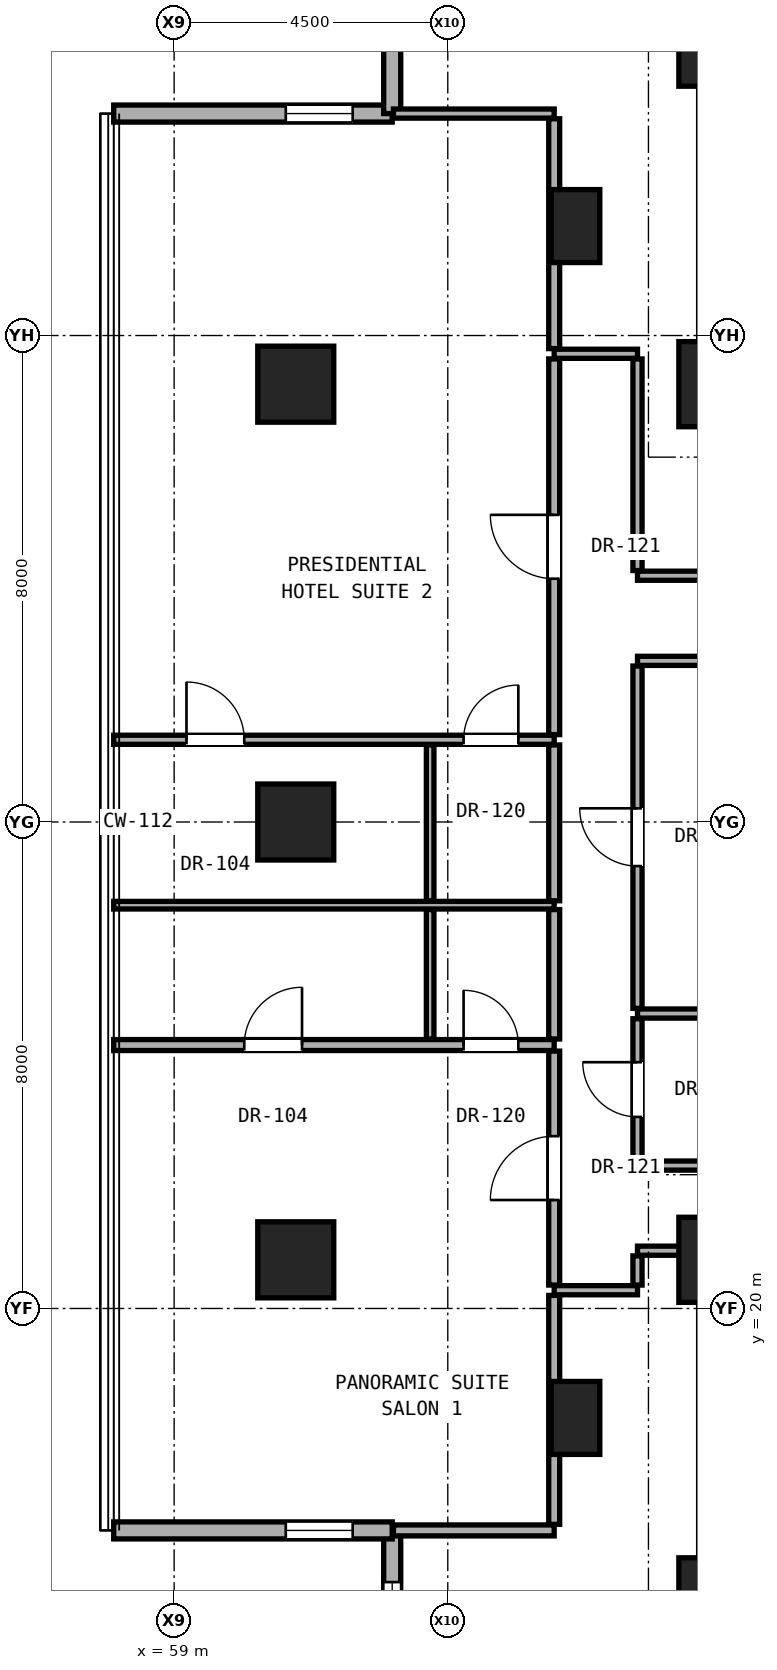
"""IFC4 building model, lengths in metres.
Left out: names, types, materials, properties, quantities, classifications, styles, units other than length and angle.
Written with IfcOpenShell. Run it as: python <this file> out.ifc"""

import sys

from ifc_helpers import new_model, si_unit, direction, frame, frame_2d, origin, origin_2d, place, context, subcontext, project, spatial, rectangle, hollow_rectangle, extrude, element, fill, save


model = new_model("IFC4")
c1 = context("Model", 3, precision=1e-05, world=origin(), true_north=direction((0.0, 1.0)))
c2 = subcontext(c1, "Body", "Model", "MODEL_VIEW")
j1 = project(units=[si_unit("LENGTHUNIT", "METRE"), si_unit("PLANEANGLEUNIT", "RADIAN")], contexts=[c1])
p1 = place(None, origin())
s1 = spatial("IfcSite", under=j1, at=p1, CompositionType="ELEMENT")
p2 = place(p1, origin())
s2 = spatial("IfcBuilding", under=s1, at=p2, CompositionType="ELEMENT")
p3 = place(p2, frame((0.0, 0.0, 32.3)))
s3 = spatial("IfcBuildingStorey", under=s2, at=p3, CompositionType="ELEMENT", Elevation=32.3)
for number, where, z_axis, x_axis in (
    (1, (68.0, 15.2, 0.0), (0.0, 0.0, 1.0), (1.0, 0.0, 0.0)),
    (2, (68.0, 20.8, 0.0), (0.0, 0.0, 1.0), (1.0, 0.0, 0.0)),
    (3, (68.0, 35.2, 0.0), (0.0, 0.0, 1.0), (1.0, 0.0, 0.0)),
    (4, (68.0, 40.8, 0.0), (0.0, 0.0, 1.0), (1.0, 0.0, 0.0)),
):
    element("IfcColumn", number, at=place(p3, frame(where, z_axis=z_axis, x_axis=x_axis)), inside=s3, PredefinedType="COLUMN", context=c2, shape_type="SweptSolid", body=[
        extrude(rectangle(XDim=1.4, YDim=1.4, at=origin_2d()), origin(), (0.0, 0.0, 1.0), 3.3),
    ])
for number, where, z_axis, x_axis in (
    (5, (61.0, 20.8, 0.0), (0.0, 0.0, 1.0), (1.0, 0.0, 0.0)),
    (6, (61.0, 28.0, 0.0), (0.0, 0.0, 1.0), (1.0, 0.0, 0.0)),
    (7, (61.0, 35.2, 0.0), (0.0, 0.0, 1.0), (1.0, 0.0, 0.0)),
):
    element("IfcColumn", number, at=place(p3, frame(where, z_axis=z_axis, x_axis=x_axis)), inside=s3, PredefinedType="COLUMN", context=c2, shape_type="SweptSolid", body=[
        extrude(hollow_rectangle(XDim=1.25, YDim=1.25, WallThickness=0.07, at=origin_2d()), origin(), (0.0, 0.0, 1.0), 3.3),
    ])
for number, where, z_axis, x_axis in (
    (8, (65.6, 18.2, 0.0), (0.0, 0.0, 1.0), (1.0, 0.0, 0.0)),
    (9, (65.6, 37.8, 0.0), (0.0, 0.0, 1.0), (1.0, 0.0, 0.0)),
):
    element("IfcColumn", number, at=place(p3, frame(where, z_axis=z_axis, x_axis=x_axis)), inside=s3, PredefinedType="PILASTER", context=c2, shape_type="SweptSolid", body=[
        extrude(rectangle(XDim=0.8, YDim=1.2, at=origin_2d()), origin(), (0.0, 0.0, 1.0), 3.3),
    ])
p4 = place(p3, frame((62.586, 16.35, 0.0), z_axis=(0.0, 0.0, 1.0), x_axis=(0.0, -1.0, 0.0)))
e10 = element("IfcWall", 10, at=p4, inside=s3, PredefinedType="SOLIDWALL", context=c2, shape_type="SweptSolid", body=[
    extrude(rectangle(XDim=4.58, YDim=0.28, at=frame_2d((2.29, 0.0))), origin(), (0.0, 0.0, 1.0), 3.04),
])
p5 = place(p4, frame((0.85, 0.0, 0.79)))
e11 = element("IfcOpeningElement", 11, at=p5, cuts=e10, PredefinedType="OPENING", context=c2, shape_type="SweptSolid", body=[
    extrude(rectangle(XDim=1.2, YDim=2.1, at=frame_2d((0.6, 1.05))), frame((0.0, 0.15, 0.0), z_axis=(0.0, -1.0, 0.0), x_axis=(1.0, 0.0, 0.0)), (0.0, 0.0, 1.0), 0.3),
])
p6 = place(p3, frame((58.006, 16.35, 0.0), z_axis=(0.0, 0.0, 1.0), x_axis=(1.0, 0.0, 0.0)))
e12 = element("IfcWall", 12, at=p6, inside=s3, PredefinedType="SOLIDWALL", context=c2, shape_type="SweptSolid", body=[
    extrude(rectangle(XDim=4.58, YDim=0.28, at=frame_2d((2.29, 0.0))), origin(), (0.0, 0.0, 1.0), 3.04),
])
p7 = place(p6, frame((2.83, 0.0, 0.85)))
e13 = element("IfcOpeningElement", 13, at=p7, cuts=e12, PredefinedType="OPENING", context=c2, shape_type="SweptSolid", body=[
    extrude(rectangle(XDim=1.1, YDim=2.0, at=frame_2d((0.55, 1.0))), frame((0.0, 0.15, 0.0), z_axis=(0.0, -1.0, 0.0), x_axis=(1.0, 0.0, 0.0)), (0.0, 0.0, 1.0), 0.3),
])
p8 = place(p3, frame((62.586, 39.65, 0.0), z_axis=(0.0, 0.0, 1.0), x_axis=(-1.0, 0.0, 0.0)))
e14 = element("IfcWall", 14, at=p8, inside=s3, PredefinedType="SOLIDWALL", context=c2, shape_type="SweptSolid", body=[
    extrude(rectangle(XDim=4.58, YDim=0.28, at=frame_2d((2.29, 0.0))), origin(), (0.0, 0.0, 1.0), 3.04),
])
p9 = place(p8, frame((0.65, 0.0, 0.85)))
e15 = element("IfcOpeningElement", 15, at=p9, cuts=e14, PredefinedType="OPENING", context=c2, shape_type="SweptSolid", body=[
    extrude(rectangle(XDim=1.1, YDim=2.0, at=frame_2d((0.55, 1.0))), frame((0.0, 0.15, 0.0), z_axis=(0.0, -1.0, 0.0), x_axis=(1.0, 0.0, 0.0)), (0.0, 0.0, 1.0), 0.3),
])
p10 = place(p3, frame((62.586, 44.23, 0.0), z_axis=(0.0, 0.0, 1.0), x_axis=(0.0, -1.0, 0.0)))
e16 = element("IfcWall", 16, at=p10, inside=s3, PredefinedType="SOLIDWALL", context=c2, shape_type="SweptSolid", body=[
    extrude(rectangle(XDim=4.58, YDim=0.28, at=frame_2d((2.29, 0.0))), origin(), (0.0, 0.0, 1.0), 3.04),
])
p11 = place(p3, frame((62.606, 16.35, 0.0), z_axis=(0.0, 0.0, 1.0), x_axis=(1.0, 0.0, 0.0)))
e17 = element("IfcWall", 17, at=p11, inside=s3, PredefinedType="PARTITIONING", context=c2, shape_type="SweptSolid", body=[
    extrude(rectangle(XDim=2.644, YDim=0.18, at=frame_2d((1.322, 0.0))), origin(), (0.0, 0.0, 1.0), 3.06),
])
p12 = place(p3, frame((65.25, 20.3, 0.0), z_axis=(0.0, 0.0, 1.0), x_axis=(1.0, 0.0, 0.0)))
e18 = element("IfcWall", 18, at=p12, inside=s3, PredefinedType="PARTITIONING", context=c2, shape_type="SweptSolid", body=[
    extrude(rectangle(XDim=1.37, YDim=0.15, at=frame_2d((0.685, 0.0))), origin(), (0.0, 0.0, 1.0), 3.06),
])
p13 = place(p3, frame((66.62, 20.95, 0.0), z_axis=(0.0, 0.0, 1.0), x_axis=(1.0, 0.0, 0.0)))
e19 = element("IfcWall", 19, at=p13, inside=s3, PredefinedType="PARTITIONING", context=c2, shape_type="SweptSolid", body=[
    extrude(rectangle(XDim=1.01, YDim=0.15, at=frame_2d((0.505, 0.0))), origin(), (0.0, 0.0, 1.0), 2.452),
])
p14 = place(p3, frame((66.62, 22.35, 0.0), z_axis=(0.0, 0.0, 1.0), x_axis=(1.0, 0.0, 0.0)))
e20 = element("IfcWall", 20, at=p14, inside=s3, PredefinedType="PARTITIONING", context=c2, shape_type="SweptSolid", body=[
    extrude(rectangle(XDim=19.63, YDim=0.15, at=frame_2d((9.815, 0.0))), origin(), (0.0, 0.0, 1.0), 2.125),
])
p15 = place(p14, frame((12.085, 0.0, 0.0)))
e21 = element("IfcOpeningElement", 21, at=p15, cuts=e20, PredefinedType="OPENING", context=c2, shape_type="SweptSolid", body=[
    extrude(rectangle(XDim=0.85, YDim=2.01, at=frame_2d((0.425, 1.005))), frame((0.0, 0.085, 0.0), z_axis=(0.0, -1.0, 0.0), x_axis=(1.0, 0.0, 0.0)), (0.0, 0.0, 1.0), 0.17),
])
p16 = place(p3, frame((58.006, 24.332, 0.0), z_axis=(0.0, 0.0, 1.0), x_axis=(1.0, 0.0, 0.0)))
e22 = element("IfcWall", 22, at=p16, inside=s3, PredefinedType="PARTITIONING", context=c2, shape_type="SweptSolid", body=[
    extrude(rectangle(XDim=7.244, YDim=0.18, at=frame_2d((3.622, 0.0))), origin(), (0.0, 0.0, 1.0), 2.196),
])
p17 = place(p16, frame((2.147, 0.0, 0.0)))
e23 = element("IfcOpeningElement", 23, at=p17, cuts=e22, PredefinedType="OPENING", context=c2, shape_type="SweptSolid", body=[
    extrude(rectangle(XDim=0.95, YDim=2.15, at=frame_2d((0.475, 1.075))), frame((0.0, 0.1, 0.0), z_axis=(0.0, -1.0, 0.0), x_axis=(1.0, 0.0, 0.0)), (0.0, 0.0, 1.0), 0.2),
])
p18 = place(p16, frame((5.754, 0.0, 0.0)))
e24 = element("IfcOpeningElement", 24, at=p18, cuts=e22, PredefinedType="OPENING", context=c2, shape_type="SweptSolid", body=[
    extrude(rectangle(XDim=0.9, YDim=2.1, at=frame_2d((0.45, 1.05))), frame((0.0, 0.1, 0.0), z_axis=(0.0, -1.0, 0.0), x_axis=(1.0, 0.0, 0.0)), (0.0, 0.0, 1.0), 0.2),
])
p19 = place(p3, frame((66.62, 24.85, 0.0), z_axis=(0.0, 0.0, 1.0), x_axis=(1.0, 0.0, 0.0)))
e25 = element("IfcWall", 25, at=p19, inside=s3, PredefinedType="PARTITIONING", context=c2, shape_type="SweptSolid", body=[
    extrude(rectangle(XDim=3.13, YDim=0.15, at=frame_2d((1.565, 0.0))), origin(), (0.0, 0.0, 1.0), 2.125),
])
p20 = place(p3, frame((58.006, 26.632, 0.0), z_axis=(0.0, 0.0, 1.0), x_axis=(1.0, 0.0, 0.0)))
e26 = element("IfcWall", 26, at=p20, inside=s3, PredefinedType="PARTITIONING", context=c2, shape_type="SweptSolid", body=[
    extrude(rectangle(XDim=7.244, YDim=0.125, at=frame_2d((3.622, 0.0))), origin(), (0.0, 0.0, 1.0), 2.196),
])
p21 = place(p3, frame((58.006, 29.352, 0.0), z_axis=(0.0, 0.0, 1.0), x_axis=(1.0, 0.0, 0.0)))
e27 = element("IfcWall", 27, at=p21, inside=s3, PredefinedType="PARTITIONING", context=c2, shape_type="SweptSolid", body=[
    extrude(rectangle(XDim=7.244, YDim=0.15, at=frame_2d((3.622, 0.0))), origin(), (0.0, 0.0, 1.0), 2.196),
])
p22 = place(p21, frame((1.197, 0.0, 0.0)))
e28 = element("IfcOpeningElement", 28, at=p22, cuts=e27, PredefinedType="OPENING", context=c2, shape_type="SweptSolid", body=[
    extrude(rectangle(XDim=0.95, YDim=2.15, at=frame_2d((0.475, 1.075))), frame((0.0, 0.085, 0.0), z_axis=(0.0, -1.0, 0.0), x_axis=(1.0, 0.0, 0.0)), (0.0, 0.0, 1.0), 0.17),
])
p23 = place(p21, frame((5.754, 0.0, 0.0)))
e29 = element("IfcOpeningElement", 29, at=p23, cuts=e27, PredefinedType="OPENING", context=c2, shape_type="SweptSolid", body=[
    extrude(rectangle(XDim=0.9, YDim=2.1, at=frame_2d((0.45, 1.05))), frame((0.0, 0.085, 0.0), z_axis=(0.0, -1.0, 0.0), x_axis=(1.0, 0.0, 0.0)), (0.0, 0.0, 1.0), 0.17),
])
p24 = place(p3, frame((66.62, 30.65, 0.0), z_axis=(0.0, 0.0, 1.0), x_axis=(1.0, 0.0, 0.0)))
e30 = element("IfcWall", 30, at=p24, inside=s3, PredefinedType="PARTITIONING", context=c2, shape_type="SweptSolid", body=[
    extrude(rectangle(XDim=19.63, YDim=0.15, at=frame_2d((9.815, 0.0))), origin(), (0.0, 0.0, 1.0), 2.125),
])
p25 = place(p24, frame((3.855, 0.0, 0.0)))
e31 = element("IfcOpeningElement", 31, at=p25, cuts=e30, PredefinedType="OPENING", context=c2, shape_type="SweptSolid", body=[
    extrude(rectangle(XDim=0.85, YDim=2.01, at=frame_2d((0.425, 1.005))), frame((0.0, 0.085, 0.0), z_axis=(0.0, -1.0, 0.0), x_axis=(1.0, 0.0, 0.0)), (0.0, 0.0, 1.0), 0.17),
])
p26 = place(p24, frame((12.085, 0.0, 0.0)))
e32 = element("IfcOpeningElement", 32, at=p26, cuts=e30, PredefinedType="OPENING", context=c2, shape_type="SweptSolid", body=[
    extrude(rectangle(XDim=0.85, YDim=2.01, at=frame_2d((0.425, 1.005))), frame((0.0, 0.085, 0.0), z_axis=(0.0, -1.0, 0.0), x_axis=(1.0, 0.0, 0.0)), (0.0, 0.0, 1.0), 0.17),
])
p27 = place(p3, frame((66.62, 32.05, 0.0), z_axis=(0.0, 0.0, 1.0), x_axis=(1.0, 0.0, 0.0)))
e33 = element("IfcWall", 33, at=p27, inside=s3, PredefinedType="PARTITIONING", context=c2, shape_type="SweptSolid", body=[
    extrude(rectangle(XDim=2.18, YDim=0.15, at=frame_2d((1.09, 0.0))), origin(), (0.0, 0.0, 1.0), 2.125),
])
p28 = place(p3, frame((65.25, 35.7, 0.0), z_axis=(0.0, 0.0, 1.0), x_axis=(1.0, 0.0, 0.0)))
e34 = element("IfcWall", 34, at=p28, inside=s3, PredefinedType="PARTITIONING", context=c2, shape_type="SweptSolid", body=[
    extrude(rectangle(XDim=1.37, YDim=0.15, at=frame_2d((0.685, 0.0))), origin(), (0.0, 0.0, 1.0), 3.06),
])
p29 = place(p3, frame((62.606, 39.65, 0.0), z_axis=(0.0, 0.0, 1.0), x_axis=(1.0, 0.0, 0.0)))
e35 = element("IfcWall", 35, at=p29, inside=s3, PredefinedType="PARTITIONING", context=c2, shape_type="SweptSolid", body=[
    extrude(rectangle(XDim=2.644, YDim=0.15, at=frame_2d((1.322, 0.0))), origin(), (0.0, 0.0, 1.0), 3.06),
])
p30 = place(p3, frame((63.21, 24.432, 0.0), z_axis=(0.0, 0.0, 1.0), x_axis=(0.0, 1.0, 0.0)))
e36 = element("IfcWall", 36, at=p30, inside=s3, PredefinedType="PARTITIONING", context=c2, shape_type="SweptSolid", body=[
    extrude(rectangle(XDim=2.128, YDim=0.125, at=frame_2d((1.064, 0.0))), origin(), (0.0, 0.0, 1.0), 3.06),
])
p31 = place(p3, frame((63.21, 26.705, 0.0), z_axis=(0.0, 0.0, 1.0), x_axis=(0.0, 1.0, 0.0)))
e37 = element("IfcWall", 37, at=p31, inside=s3, PredefinedType="PARTITIONING", context=c2, shape_type="SweptSolid", body=[
    extrude(rectangle(XDim=2.562, YDim=0.125, at=frame_2d((1.281, 0.0))), origin(), (0.0, 0.0, 1.0), 2.279),
])
p32 = place(p3, frame((65.25, 16.45, 0.0), z_axis=(0.0, 0.0, 1.0), x_axis=(0.0, 1.0, 0.0)))
e38 = element("IfcWall", 38, at=p32, inside=s3, PredefinedType="PARTITIONING", context=c2, shape_type="SweptSolid", body=[
    extrude(rectangle(XDim=3.765, YDim=0.18, at=frame_2d((1.883, 0.0))), origin(), (0.0, 0.0, 1.0), 2.436),
])
p33 = place(p3, frame((65.25, 20.385, 0.0), z_axis=(0.0, 0.0, 1.0), x_axis=(0.0, 1.0, 0.0)))
e39 = element("IfcWall", 39, at=p33, inside=s3, PredefinedType="PARTITIONING", context=c2, shape_type="SweptSolid", body=[
    extrude(rectangle(XDim=3.847, YDim=0.18, at=frame_2d((1.923, 0.0))), origin(), (0.0, 0.0, 1.0), 2.452),
])
p34 = place(p33, frame((1.398, 0.0, 0.0)))
e40 = element("IfcOpeningElement", 40, at=p34, cuts=e39, PredefinedType="OPENING", context=c2, shape_type="SweptSolid", body=[
    extrude(rectangle(XDim=1.05, YDim=2.2, at=frame_2d((0.525, 1.1))), frame((0.0, 0.1, 0.0), z_axis=(0.0, -1.0, 0.0), x_axis=(1.0, 0.0, 0.0)), (0.0, 0.0, 1.0), 0.2),
])
p35 = place(p3, frame((65.25, 24.432, 0.0), z_axis=(0.0, 0.0, 1.0), x_axis=(0.0, 1.0, 0.0)))
e41 = element("IfcWall", 41, at=p35, inside=s3, PredefinedType="PARTITIONING", context=c2, shape_type="SweptSolid", body=[
    extrude(rectangle(XDim=2.128, YDim=0.18, at=frame_2d((1.064, 0.0))), origin(), (0.0, 0.0, 1.0), 3.06),
])
p36 = place(p3, frame((65.25, 26.705, 0.0), z_axis=(0.0, 0.0, 1.0), x_axis=(0.0, 1.0, 0.0)))
e42 = element("IfcWall", 42, at=p36, inside=s3, PredefinedType="PARTITIONING", context=c2, shape_type="SweptSolid", body=[
    extrude(rectangle(XDim=2.562, YDim=0.18, at=frame_2d((1.281, 0.0))), origin(), (0.0, 0.0, 1.0), 2.279),
])
p37 = place(p3, frame((65.25, 29.437, 0.0), z_axis=(0.0, 0.0, 1.0), x_axis=(0.0, 1.0, 0.0)))
e43 = element("IfcWall", 43, at=p37, inside=s3, PredefinedType="PARTITIONING", context=c2, shape_type="SweptSolid", body=[
    extrude(rectangle(XDim=6.178, YDim=0.18, at=frame_2d((3.089, 0.0))), origin(), (0.0, 0.0, 1.0), 2.452),
])
p38 = place(p37, frame((2.564, 0.0, 0.0)))
e44 = element("IfcOpeningElement", 44, at=p38, cuts=e43, PredefinedType="OPENING", context=c2, shape_type="SweptSolid", body=[
    extrude(rectangle(XDim=1.05, YDim=2.2, at=frame_2d((0.525, 1.1))), frame((0.0, 0.1, 0.0), z_axis=(0.0, -1.0, 0.0), x_axis=(1.0, 0.0, 0.0)), (0.0, 0.0, 1.0), 0.2),
])
p39 = place(p3, frame((65.25, 35.785, 0.0), z_axis=(0.0, 0.0, 1.0), x_axis=(0.0, 1.0, 0.0)))
e45 = element("IfcWall", 45, at=p39, inside=s3, PredefinedType="PARTITIONING", context=c2, shape_type="SweptSolid", body=[
    extrude(rectangle(XDim=3.78, YDim=0.18, at=frame_2d((1.89, 0.0))), origin(), (0.0, 0.0, 1.0), 2.436),
])
p40 = place(p3, frame((66.62, 20.385, 0.0), z_axis=(0.0, 0.0, 1.0), x_axis=(0.0, 1.0, 0.0)))
e46 = element("IfcWall", 46, at=p40, inside=s3, PredefinedType="PARTITIONING", context=c2, shape_type="SweptSolid", body=[
    extrude(rectangle(XDim=0.48, YDim=0.15, at=frame_2d((0.24, 0.0))), origin(), (0.0, 0.0, 1.0), 2.452),
])
p41 = place(p3, frame((66.62, 22.435, 0.0), z_axis=(0.0, 0.0, 1.0), x_axis=(0.0, 1.0, 0.0)))
e47 = element("IfcWall", 47, at=p41, inside=s3, PredefinedType="PARTITIONING", context=c2, shape_type="SweptSolid", body=[
    extrude(rectangle(XDim=2.33, YDim=0.15, at=frame_2d((1.165, 0.0))), origin(), (0.0, 0.0, 1.0), 3.06),
])
p42 = place(p41, frame((0.715, 0.0, 0.0)))
e48 = element("IfcOpeningElement", 48, at=p42, cuts=e47, PredefinedType="OPENING", context=c2, shape_type="SweptSolid", body=[
    extrude(rectangle(XDim=0.9, YDim=2.1, at=frame_2d((0.45, 1.05))), frame((0.0, 0.085, 0.0), z_axis=(0.0, -1.0, 0.0), x_axis=(1.0, 0.0, 0.0)), (0.0, 0.0, 1.0), 0.17),
])
p43 = place(p3, frame((66.62, 24.935, 0.0), z_axis=(0.0, 0.0, 1.0), x_axis=(0.0, 1.0, 0.0)))
e49 = element("IfcWall", 49, at=p43, inside=s3, PredefinedType="PARTITIONING", context=c2, shape_type="SweptSolid", body=[
    extrude(rectangle(XDim=5.63, YDim=0.15, at=frame_2d((2.815, 0.0))), origin(), (0.0, 0.0, 1.0), 2.279),
])
p44 = place(p43, frame((2.34, 0.0, 0.0)))
e50 = element("IfcOpeningElement", 50, at=p44, cuts=e49, PredefinedType="OPENING", context=c2, shape_type="SweptSolid", body=[
    extrude(rectangle(XDim=0.95, YDim=2.15, at=frame_2d((0.475, 1.075))), frame((0.0, 0.085, 0.0), z_axis=(0.0, -1.0, 0.0), x_axis=(1.0, 0.0, 0.0)), (0.0, 0.0, 1.0), 0.17),
])
p45 = place(p3, frame((66.62, 32.135, 0.0), z_axis=(0.0, 0.0, 1.0), x_axis=(0.0, 1.0, 0.0)))
e51 = element("IfcWall", 51, at=p45, inside=s3, PredefinedType="PARTITIONING", context=c2, shape_type="SweptSolid", body=[
    extrude(rectangle(XDim=3.48, YDim=0.15, at=frame_2d((1.74, 0.0))), origin(), (0.0, 0.0, 1.0), 2.452),
])
p46 = place(p5, origin())
e52 = element("IfcWindow", 52, at=p46, inside=s3, PartitioningType="SINGLE_PANEL", PredefinedType="WINDOW", context=c2, shape_type="SweptSolid", body=[
    extrude(rectangle(XDim=1.2, YDim=2.1, at=frame_2d((0.6, 1.05))), frame((0.0, 0.03, 0.0), z_axis=(0.0, -1.0, 0.0), x_axis=(1.0, 0.0, 0.0)), (0.0, 0.0, 1.0), 0.06),
])
fill(e11, e52)
p47 = place(p7, origin())
e53 = element("IfcWindow", 53, at=p47, inside=s3, PartitioningType="SINGLE_PANEL", PredefinedType="WINDOW", context=c2, shape_type="SweptSolid", body=[
    extrude(rectangle(XDim=1.1, YDim=2.0, at=frame_2d((0.55, 1.0))), frame((0.0, 0.03, 0.0), z_axis=(0.0, -1.0, 0.0), x_axis=(1.0, 0.0, 0.0)), (0.0, 0.0, 1.0), 0.06),
])
fill(e13, e53)
p48 = place(p9, origin())
e54 = element("IfcWindow", 54, at=p48, inside=s3, PartitioningType="SINGLE_PANEL", PredefinedType="WINDOW", context=c2, shape_type="SweptSolid", body=[
    extrude(rectangle(XDim=1.1, YDim=2.0, at=frame_2d((0.55, 1.0))), frame((0.0, 0.03, 0.0), z_axis=(0.0, -1.0, 0.0), x_axis=(1.0, 0.0, 0.0)), (0.0, 0.0, 1.0), 0.06),
])
fill(e15, e54)
p49 = place(p42, origin())
e55 = element("IfcDoor", 55, at=p49, inside=s3, OperationType="SINGLE_SWING_RIGHT", PredefinedType="DOOR", context=c2, shape_type="SweptSolid", body=[
    extrude(rectangle(XDim=0.9, YDim=2.1, at=frame_2d((0.45, 1.05))), frame((0.0, 0.025, 0.0), z_axis=(0.0, -1.0, 0.0), x_axis=(1.0, 0.0, 0.0)), (0.0, 0.0, 1.0), 0.05),
])
fill(e48, e55)
p50 = place(p34, origin())
e56 = element("IfcDoor", 56, at=p50, inside=s3, OperationType="SINGLE_SWING_LEFT", PredefinedType="DOOR", context=c2, shape_type="SweptSolid", body=[
    extrude(rectangle(XDim=1.05, YDim=2.2, at=frame_2d((0.525, 1.1))), frame((0.0, 0.025, 0.0), z_axis=(0.0, -1.0, 0.0), x_axis=(1.0, 0.0, 0.0)), (0.0, 0.0, 1.0), 0.05),
])
fill(e40, e56)
p51 = place(p17, origin())
e57 = element("IfcDoor", 57, at=p51, inside=s3, OperationType="SINGLE_SWING_RIGHT", PredefinedType="DOOR", context=c2, shape_type="SweptSolid", body=[
    extrude(rectangle(XDim=0.95, YDim=2.15, at=frame_2d((0.475, 1.075))), frame((0.0, 0.025, 0.0), z_axis=(0.0, -1.0, 0.0), x_axis=(1.0, 0.0, 0.0)), (0.0, 0.0, 1.0), 0.05),
])
fill(e23, e57)
p52 = place(p18, origin())
e58 = element("IfcDoor", 58, at=p52, inside=s3, OperationType="SINGLE_SWING_LEFT", PredefinedType="DOOR", context=c2, shape_type="SweptSolid", body=[
    extrude(rectangle(XDim=0.9, YDim=2.1, at=frame_2d((0.45, 1.05))), frame((0.0, 0.025, 0.0), z_axis=(0.0, -1.0, 0.0), x_axis=(1.0, 0.0, 0.0)), (0.0, 0.0, 1.0), 0.05),
])
fill(e24, e58)
p53 = place(p38, origin())
e59 = element("IfcDoor", 59, at=p53, inside=s3, OperationType="SINGLE_SWING_RIGHT", PredefinedType="DOOR", context=c2, shape_type="SweptSolid", body=[
    extrude(rectangle(XDim=1.05, YDim=2.2, at=frame_2d((0.525, 1.1))), frame((0.0, 0.025, 0.0), z_axis=(0.0, -1.0, 0.0), x_axis=(1.0, 0.0, 0.0)), (0.0, 0.0, 1.0), 0.05),
])
fill(e44, e59)
p54 = place(p22, origin())
e60 = element("IfcDoor", 60, at=p54, inside=s3, OperationType="SINGLE_SWING_LEFT", PredefinedType="DOOR", context=c2, shape_type="SweptSolid", body=[
    extrude(rectangle(XDim=0.95, YDim=2.15, at=frame_2d((0.475, 1.075))), frame((0.0, 0.025, 0.0), z_axis=(0.0, -1.0, 0.0), x_axis=(1.0, 0.0, 0.0)), (0.0, 0.0, 1.0), 0.05),
])
fill(e28, e60)
p55 = place(p23, origin())
e61 = element("IfcDoor", 61, at=p55, inside=s3, OperationType="SINGLE_SWING_RIGHT", PredefinedType="DOOR", context=c2, shape_type="SweptSolid", body=[
    extrude(rectangle(XDim=0.9, YDim=2.1, at=frame_2d((0.45, 1.05))), frame((0.0, 0.025, 0.0), z_axis=(0.0, -1.0, 0.0), x_axis=(1.0, 0.0, 0.0)), (0.0, 0.0, 1.0), 0.05),
])
fill(e29, e61)
p56 = place(p44, origin())
e62 = element("IfcDoor", 62, at=p56, inside=s3, OperationType="SINGLE_SWING_RIGHT", PredefinedType="DOOR", context=c2, shape_type="SweptSolid", body=[
    extrude(rectangle(XDim=0.95, YDim=2.15, at=frame_2d((0.475, 1.075))), frame((0.0, 0.025, 0.0), z_axis=(0.0, -1.0, 0.0), x_axis=(1.0, 0.0, 0.0)), (0.0, 0.0, 1.0), 0.05),
])
fill(e50, e62)
save(model, sys.argv[1])
